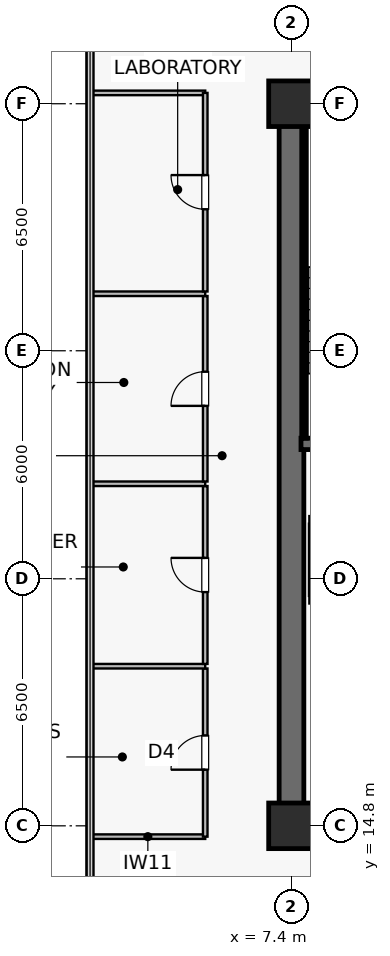
"""IFC4 building model, lengths in metres.
Left out: names, types, materials, properties, quantities, classifications, styles, units other than length and angle.
Written with IfcOpenShell. Run it as: python <this file> out.ifc"""

import sys

from ifc_helpers import new_model, si_unit, direction, frame, frame_2d, origin, origin_2d, place, context, subcontext, project, spatial, rectangle, extrude, source, transform, mapped, element, fill, save


model = new_model("IFC4")
c1 = context("Model", 3, precision=1e-05, world=origin(), true_north=direction((0.0, 1.0)))
c2 = subcontext(c1, "Body", "Model", "MODEL_VIEW")
j1 = project(units=[si_unit("LENGTHUNIT", "METRE"), si_unit("PLANEANGLEUNIT", "RADIAN")], contexts=[c1])
p1 = place(None, origin())
s1 = spatial("IfcSite", under=j1, at=p1, CompositionType="ELEMENT")
p2 = place(p1, origin())
s2 = spatial("IfcBuilding", under=s1, at=p2, CompositionType="ELEMENT")
p3 = place(p2, frame((0.0, 0.0, 150.2)))
s3 = spatial("IfcBuildingStorey", under=s2, at=p3, CompositionType="ELEMENT", Elevation=150.2)
p4 = place(p3, frame((7.075, 14.8, 0.0), z_axis=(0.0, 0.0, 1.0), x_axis=(1.0, 0.0, 0.0)))
e1 = element("IfcWall", 1, at=p4, inside=s3, PredefinedType="SHEAR", context=c2, shape_type="SweptSolid", body=[
    extrude(rectangle(XDim=15.45, YDim=0.65, at=frame_2d((7.725, 0.0))), origin(), (0.0, 0.0, 1.0), 3.79),
])
p5 = place(p3, frame((7.075, 33.8, 0.0), z_axis=(0.0, 0.0, 1.0), x_axis=(1.0, 0.0, 0.0)))
e2 = element("IfcWall", 2, at=p5, inside=s3, PredefinedType="SHEAR", context=c2, shape_type="SweptSolid", body=[
    extrude(rectangle(XDim=15.45, YDim=0.65, at=frame_2d((7.725, 0.0))), origin(), (0.0, 0.0, 1.0), 3.79),
])
p6 = place(p5, frame((5.675, 0.0, 0.0)))
e3 = element("IfcOpeningElement", 3, at=p6, cuts=e2, PredefinedType="OPENING", context=c2, shape_type="SweptSolid", body=[
    extrude(rectangle(XDim=0.95, YDim=2.15, at=frame_2d((0.475, 1.075))), frame((0.0, 0.335, 0.0), z_axis=(0.0, -1.0, 0.0), x_axis=(1.0, 0.0, 0.0)), (0.0, 0.0, 1.0), 0.67),
])
p7 = place(p5, frame((9.04, 0.0, 0.0)))
e4 = element("IfcOpeningElement", 4, at=p7, cuts=e2, PredefinedType="OPENING", context=c2, shape_type="SweptSolid", body=[
    extrude(rectangle(XDim=0.95, YDim=2.15, at=frame_2d((0.475, 1.075))), frame((0.0, 0.335, 0.0), z_axis=(0.0, -1.0, 0.0), x_axis=(1.0, 0.0, 0.0)), (0.0, 0.0, 1.0), 0.67),
])
p8 = place(p5, frame((12.44, 0.0, 0.0)))
e5 = element("IfcOpeningElement", 5, at=p8, cuts=e2, PredefinedType="OPENING", context=c2, shape_type="SweptSolid", body=[
    extrude(rectangle(XDim=0.95, YDim=2.15, at=frame_2d((0.475, 1.075))), frame((0.0, 0.335, 0.0), z_axis=(0.0, -1.0, 0.0), x_axis=(1.0, 0.0, 0.0)), (0.0, 0.0, 1.0), 0.67),
])
p9 = place(p3, frame((7.4, 15.125, 0.0), z_axis=(0.0, 0.0, 1.0), x_axis=(0.0, 1.0, 0.0)))
e6 = element("IfcWall", 6, at=p9, inside=s3, PredefinedType="SHEAR", context=c2, shape_type="SweptSolid", body=[
    extrude(rectangle(XDim=18.35, YDim=0.65, at=frame_2d((9.175, 0.0))), origin(), (0.0, 0.0, 1.0), 3.79),
])
p10 = place(p3, frame((7.65, 24.85, 0.0), z_axis=(0.0, 0.0, 1.0), x_axis=(1.0, 0.0, 0.0)))
e7 = element("IfcWall", 7, at=p10, inside=s3, PredefinedType="SHEAR", context=c2, shape_type="SweptSolid", body=[
    extrude(rectangle(XDim=3.8, YDim=0.3, at=frame_2d((1.9, 0.0))), origin(), (0.0, 0.0, 1.0), 3.79),
])
p11 = place(p3, frame((7.73, 33.4, 0.0), z_axis=(0.0, 0.0, 1.0), x_axis=(1.0, 0.0, 0.0)))
e8 = element("IfcWall", 8, at=p11, inside=s3, PredefinedType="SOLIDWALL", context=c2, shape_type="SweptSolid", body=[
    extrude(rectangle(XDim=3.72, YDim=0.12, at=frame_2d((1.86, 0.0))), origin(), (0.0, 0.0, 1.0), 3.79),
])
p12 = place(p3, frame((7.73, 25.0, 0.0), z_axis=(0.0, 0.0, 1.0), x_axis=(0.0, 1.0, 0.0)))
e9 = element("IfcWall", 9, at=p12, inside=s3, PredefinedType="SOLIDWALL", context=c2, shape_type="SweptSolid", body=[
    extrude(rectangle(XDim=8.32, YDim=0.12, at=frame_2d((4.16, 0.0))), origin(), (0.0, 0.0, 1.0), 3.79),
])
m1 = source(origin(), c2, "Body", "SweptSolid", [
    extrude(rectangle(XDim=1.2, YDim=1.2, at=origin_2d()), origin(), (0.0, 0.0, 1.0), 4.1),
])
for number, where, z_axis, x_axis in (
    (10, (7.4, 14.8, 0.0), (0.0, 0.0, 1.0), (1.0, 0.0, 0.0)),
    (11, (7.4, 33.8, 0.0), (0.0, 0.0, 1.0), (1.0, 0.0, 0.0)),
):
    element("IfcColumn", number, at=place(p3, frame(where, z_axis=z_axis, x_axis=x_axis)), inside=s3, PredefinedType="COLUMN", context=c2, shape_type="MappedRepresentation", body=[
        mapped(m1, transform((0.0, 0.0, 0.0), scale=1.0)),
    ])
for number, where, z_axis, x_axis in (
    (12, (7.87, 20.75, 0.0), (0.0, 0.0, 1.0), (1.0, 0.0, 0.0)),
    (13, (7.87, 22.85, 0.0), (0.0, 0.0, 1.0), (1.0, 0.0, 0.0)),
):
    element("IfcWall", number, at=place(p3, frame(where, z_axis=z_axis, x_axis=x_axis)), inside=s3, PredefinedType="SOLIDWALL", context=c2, shape_type="SweptSolid", body=[
        extrude(rectangle(XDim=2.26, YDim=0.2, at=frame_2d((1.13, 0.0))), origin(), (0.0, 0.0, 1.0), 3.79),
    ])
p13 = place(p3, frame((7.95, 20.85, 0.0), z_axis=(0.0, 0.0, 1.0), x_axis=(0.0, 1.0, 0.0)))
e14 = element("IfcWall", 14, at=p13, inside=s3, PredefinedType="SOLIDWALL", context=c2, shape_type="SweptSolid", body=[
    extrude(rectangle(XDim=1.9, YDim=0.18, at=frame_2d((0.95, 0.0))), origin(), (0.0, 0.0, 1.0), 3.79),
])
for number, where, z_axis, x_axis in (
    (15, (2.11, 14.515, 0.0), (0.0, 0.0, 1.0), (1.0, 0.0, 0.0)),
    (16, (2.11, 34.085, 0.0), (0.0, 0.0, 1.0), (1.0, 0.0, 0.0)),
):
    element("IfcWall", number, at=place(p3, frame(where, z_axis=z_axis, x_axis=x_axis)), inside=s3, PredefinedType="PARTITIONING", context=c2, shape_type="SweptSolid", body=[
        extrude(rectangle(XDim=3.02, YDim=0.12, at=frame_2d((1.51, 0.0))), origin(), (0.0, 0.0, 1.0), 3.79),
    ])
p14 = place(p3, frame((5.13, 14.515, 0.0), z_axis=(0.0, 0.0, 1.0), x_axis=(0.0, 1.0, 0.0)))
e17 = element("IfcWall", 17, at=p14, inside=s3, PredefinedType="PARTITIONING", context=c2, shape_type="SweptSolid", body=[
    extrude(rectangle(XDim=4.425, YDim=0.12, at=frame_2d((2.212, 0.0))), origin(), (0.0, 0.0, 1.0), 3.79),
])
p15 = place(p14, frame((1.762, 0.0, 0.0)))
e18 = element("IfcOpeningElement", 18, at=p15, cuts=e17, PredefinedType="OPENING", context=c2, shape_type="SweptSolid", body=[
    extrude(rectangle(XDim=0.9, YDim=2.1, at=frame_2d((0.45, 1.05))), frame((0.0, 0.07, 0.0), z_axis=(0.0, -1.0, 0.0), x_axis=(1.0, 0.0, 0.0)), (0.0, 0.0, 1.0), 0.14),
])
p16 = place(p3, frame((2.11, 19.0, 0.0), z_axis=(0.0, 0.0, 1.0), x_axis=(1.0, 0.0, 0.0)))
e19 = element("IfcWall", 19, at=p16, inside=s3, PredefinedType="PARTITIONING", context=c2, shape_type="SweptSolid", body=[
    extrude(rectangle(XDim=3.02, YDim=0.12, at=frame_2d((1.51, 0.0))), origin(), (0.0, 0.0, 1.0), 3.79),
])
p17 = place(p3, frame((5.13, 19.06, 0.0), z_axis=(0.0, 0.0, 1.0), x_axis=(0.0, 1.0, 0.0)))
e20 = element("IfcWall", 20, at=p17, inside=s3, PredefinedType="PARTITIONING", context=c2, shape_type="SweptSolid", body=[
    extrude(rectangle(XDim=4.68, YDim=0.12, at=frame_2d((2.34, 0.0))), origin(), (0.0, 0.0, 1.0), 3.79),
])
p18 = place(p17, frame((1.89, 0.0, 0.0)))
e21 = element("IfcOpeningElement", 21, at=p18, cuts=e20, PredefinedType="OPENING", context=c2, shape_type="SweptSolid", body=[
    extrude(rectangle(XDim=0.9, YDim=2.1, at=frame_2d((0.45, 1.05))), frame((0.0, 0.07, 0.0), z_axis=(0.0, -1.0, 0.0), x_axis=(1.0, 0.0, 0.0)), (0.0, 0.0, 1.0), 0.14),
])
p19 = place(p3, frame((2.11, 23.8, 0.0), z_axis=(0.0, 0.0, 1.0), x_axis=(1.0, 0.0, 0.0)))
e22 = element("IfcWall", 22, at=p19, inside=s3, PredefinedType="PARTITIONING", context=c2, shape_type="SweptSolid", body=[
    extrude(rectangle(XDim=3.02, YDim=0.12, at=frame_2d((1.51, 0.0))), origin(), (0.0, 0.0, 1.0), 3.79),
])
p20 = place(p3, frame((5.13, 23.86, 0.0), z_axis=(0.0, 0.0, 1.0), x_axis=(0.0, 1.0, 0.0)))
e23 = element("IfcWall", 23, at=p20, inside=s3, PredefinedType="PARTITIONING", context=c2, shape_type="SweptSolid", body=[
    extrude(rectangle(XDim=4.88, YDim=0.12, at=frame_2d((2.44, 0.0))), origin(), (0.0, 0.0, 1.0), 3.79),
])
p21 = place(p20, frame((1.99, 0.0, 0.0)))
e24 = element("IfcOpeningElement", 24, at=p21, cuts=e23, PredefinedType="OPENING", context=c2, shape_type="SweptSolid", body=[
    extrude(rectangle(XDim=0.9, YDim=2.1, at=frame_2d((0.45, 1.05))), frame((0.0, 0.07, 0.0), z_axis=(0.0, -1.0, 0.0), x_axis=(1.0, 0.0, 0.0)), (0.0, 0.0, 1.0), 0.14),
])
p22 = place(p3, frame((2.11, 28.8, 0.0), z_axis=(0.0, 0.0, 1.0), x_axis=(1.0, 0.0, 0.0)))
e25 = element("IfcWall", 25, at=p22, inside=s3, PredefinedType="PARTITIONING", context=c2, shape_type="SweptSolid", body=[
    extrude(rectangle(XDim=3.02, YDim=0.12, at=frame_2d((1.51, 0.0))), origin(), (0.0, 0.0, 1.0), 3.79),
])
p23 = place(p3, frame((5.13, 28.86, 0.0), z_axis=(0.0, 0.0, 1.0), x_axis=(0.0, 1.0, 0.0)))
e26 = element("IfcWall", 26, at=p23, inside=s3, PredefinedType="PARTITIONING", context=c2, shape_type="SweptSolid", body=[
    extrude(rectangle(XDim=5.225, YDim=0.12, at=frame_2d((2.612, 0.0))), origin(), (0.0, 0.0, 1.0), 3.79),
])
p24 = place(p23, frame((2.163, 0.0, 0.0)))
e27 = element("IfcOpeningElement", 27, at=p24, cuts=e26, PredefinedType="OPENING", context=c2, shape_type="SweptSolid", body=[
    extrude(rectangle(XDim=0.9, YDim=2.1, at=frame_2d((0.45, 1.05))), frame((0.0, 0.07, 0.0), z_axis=(0.0, -1.0, 0.0), x_axis=(1.0, 0.0, 0.0)), (0.0, 0.0, 1.0), 0.14),
])
m2 = source(origin(), c2, "Body", "SweptSolid", [
    extrude(rectangle(XDim=0.9, YDim=2.1, at=frame_2d((0.45, 1.05))), frame((0.0, 0.025, 0.0), z_axis=(0.0, -1.0, 0.0), x_axis=(1.0, 0.0, 0.0)), (0.0, 0.0, 1.0), 0.05),
])
p25 = place(p15, origin())
e28 = element("IfcDoor", 28, at=p25, inside=s3, OperationType="SINGLE_SWING_LEFT", PredefinedType="DOOR", context=c2, shape_type="MappedRepresentation", body=[
    mapped(m2, transform((0.0, 0.0, 0.0), scale=1.0)),
])
fill(e18, e28)
p26 = place(p18, origin())
e29 = element("IfcDoor", 29, at=p26, inside=s3, OperationType="SINGLE_SWING_RIGHT", PredefinedType="DOOR", context=c2, shape_type="MappedRepresentation", body=[
    mapped(m2, transform((0.0, 0.0, 0.0), scale=1.0)),
])
fill(e21, e29)
p27 = place(p21, origin())
e30 = element("IfcDoor", 30, at=p27, inside=s3, OperationType="SINGLE_SWING_LEFT", PredefinedType="DOOR", context=c2, shape_type="MappedRepresentation", body=[
    mapped(m2, transform((0.0, 0.0, 0.0), scale=1.0)),
])
fill(e24, e30)
p28 = place(p24, origin())
e31 = element("IfcDoor", 31, at=p28, inside=s3, OperationType="SINGLE_SWING_RIGHT", PredefinedType="DOOR", context=c2, shape_type="MappedRepresentation", body=[
    mapped(m2, transform((0.0, 0.0, 0.0), scale=1.0)),
])
fill(e27, e31)
save(model, sys.argv[1])
